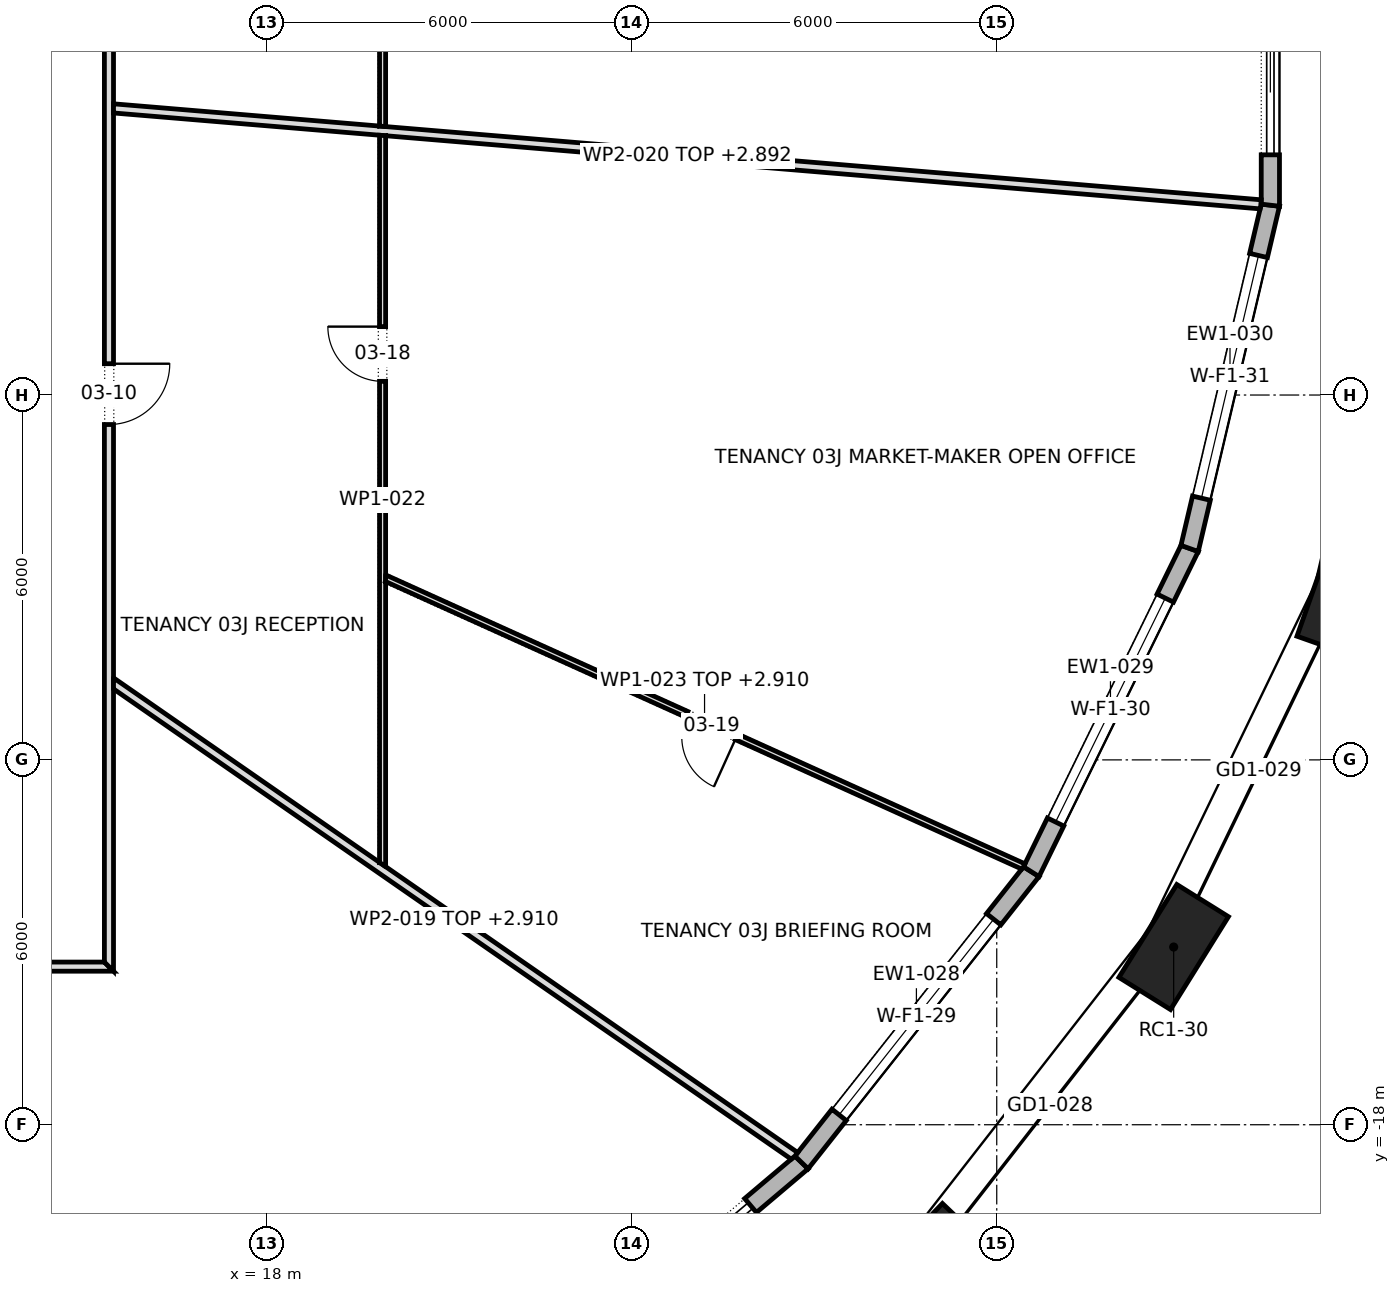
"""IFC4 building model, lengths in metres.
Left out: names, types, materials, properties, quantities, classifications, styles, units other than length and angle.
Written with IfcOpenShell. Run it as: python <this file> out.ifc"""

import sys

from ifc_helpers import new_model, si_unit, direction, frame, frame_2d, origin, origin_2d, place, context, subcontext, project, spatial, polyline, rectangle, outline, extrude, element, fill, save


model = new_model("IFC4")
c1 = context("Model", 3, precision=1e-05, world=origin(), true_north=direction((0.0, 1.0)))
c2 = subcontext(c1, "Body", "Model", "MODEL_VIEW")
j1 = project(units=[si_unit("LENGTHUNIT", "METRE"), si_unit("PLANEANGLEUNIT", "RADIAN")], contexts=[c1])
p1 = place(None, origin())
s1 = spatial("IfcSite", under=j1, at=p1, CompositionType="ELEMENT")
p2 = place(p1, origin())
s2 = spatial("IfcBuilding", under=s1, at=p2, CompositionType="ELEMENT")
p3 = place(p2, frame((0.0, 0.0, 48.7)))
s3 = spatial("IfcBuildingStorey", under=s2, at=p3, CompositionType="ELEMENT", Elevation=48.7)
for number, where, z_axis, x_axis in (
    (1, (28.845, -20.291, 0.0), (0.0, 0.0, 1.0), (0.692, 0.722, 0.0)),
    (2, (32.91, -15.078, 0.0), (0.0, 0.0, 1.0), (0.529, 0.849, 0.0)),
    (3, (35.709, -9.285, 0.0), (0.0, 0.0, 1.0), (0.334, 0.943, 0.0)),
):
    element("IfcColumn", number, at=place(p3, frame(where, z_axis=z_axis, x_axis=x_axis)), inside=s3, PredefinedType="COLUMN", context=c2, shape_type="SweptSolid", body=[
        extrude(rectangle(XDim=1.8, YDim=1.0, at=origin_2d()), origin(), (0.0, 0.0, 1.0), 4.2),
    ])
p4 = place(p3, frame((21.983, -22.684, 0.0), z_axis=(0.0, 0.0, 1.0), x_axis=(0.763614259808, 0.645672720671, 0.0)))
e4 = element("IfcWall", 4, at=p4, inside=s3, PredefinedType="STANDARD", context=c2, shape_type="SweptSolid", body=[
    extrude(outline(polyline([(-0.014, -0.15), (6.31, -0.15), (6.28, 0.15), (0.014, 0.15), (-0.014, -0.15)])), origin(), (0.0, 0.0, 1.0), 3.9),
])
p5 = place(p4, frame((1.097, 0.0, 0.0)))
e5 = element("IfcOpeningElement", 5, at=p5, cuts=e4, PredefinedType="OPENING", context=c2, shape_type="SweptSolid", body=[
    extrude(rectangle(XDim=4.1, YDim=3.45, at=frame_2d((2.05, 1.725))), frame((0.0, 0.162, 0.0), z_axis=(0.0, -1.0, 0.0), x_axis=(1.0, 0.0, 0.0)), (0.0, 0.0, 1.0), 0.324),
])
p6 = place(p3, frame((26.79, -18.62, 0.0), z_axis=(0.0, 0.0, 1.0), x_axis=(0.619993638342, 0.78460683684, 0.0)))
e6 = element("IfcWall", 6, at=p6, inside=s3, PredefinedType="STANDARD", context=c2, shape_type="SweptSolid", body=[
    extrude(outline(polyline([(-0.015, -0.15), (6.11, -0.15), (6.078, 0.15), (0.015, 0.15), (-0.015, -0.15)])), origin(), (0.0, 0.0, 1.0), 3.9),
])
p7 = place(p6, frame((0.997, 0.0, 0.6)))
e7 = element("IfcOpeningElement", 7, at=p7, cuts=e6, PredefinedType="OPENING", context=c2, shape_type="SweptSolid", body=[
    extrude(rectangle(XDim=4.1, YDim=2.85, at=frame_2d((2.05, 1.425))), frame((0.0, 0.162, 0.0), z_axis=(0.0, -1.0, 0.0), x_axis=(1.0, 0.0, 0.0)), (0.0, 0.0, 1.0), 0.324),
])
p8 = place(p3, frame((30.568, -13.838, 0.0), z_axis=(0.0, 0.0, 1.0), x_axis=(0.439906146647, 0.898043752911, 0.0)))
e8 = element("IfcWall", 8, at=p8, inside=s3, PredefinedType="STANDARD", context=c2, shape_type="SweptSolid", body=[
    extrude(outline(polyline([(-0.016, -0.15), (5.936, -0.15), (5.902, 0.15), (0.016, 0.15), (-0.016, -0.15)])), origin(), (0.0, 0.0, 1.0), 3.9),
])
p9 = place(p8, frame((0.909, 0.0, 0.6)))
e9 = element("IfcOpeningElement", 9, at=p9, cuts=e8, PredefinedType="OPENING", context=c2, shape_type="SweptSolid", body=[
    extrude(rectangle(XDim=4.1, YDim=2.85, at=frame_2d((2.05, 1.425))), frame((0.0, 0.162, 0.0), z_axis=(0.0, -1.0, 0.0), x_axis=(1.0, 0.0, 0.0)), (0.0, 0.0, 1.0), 0.324),
])
p10 = place(p3, frame((33.172, -8.523, 0.0), z_axis=(0.0, 0.0, 1.0), x_axis=(0.228990053972, 0.973428762253, 0.0)))
e10 = element("IfcWall", 10, at=p10, inside=s3, PredefinedType="STANDARD", context=c2, shape_type="SweptSolid", body=[
    extrude(outline(polyline([(-0.017, -0.15), (5.816, -0.15), (5.781, 0.15), (0.017, 0.15), (-0.017, -0.15)])), origin(), (0.0, 0.0, 1.0), 3.9),
])
p11 = place(p10, frame((0.849, 0.0, 0.6)))
e11 = element("IfcOpeningElement", 11, at=p11, cuts=e10, PredefinedType="OPENING", context=c2, shape_type="SweptSolid", body=[
    extrude(rectangle(XDim=4.1, YDim=2.85, at=frame_2d((2.05, 1.425))), frame((0.0, 0.162, 0.0), z_axis=(0.0, -1.0, 0.0), x_axis=(1.0, 0.0, 0.0)), (0.0, 0.0, 1.0), 0.324),
])
p12 = place(p3, frame((34.5, -2.878, 0.0), z_axis=(0.0, 0.0, 1.0), x_axis=(0.0, 1.0, 0.0)))
e12 = element("IfcWall", 12, at=p12, inside=s3, PredefinedType="STANDARD", context=c2, shape_type="SweptSolid", body=[
    extrude(outline(polyline([(-0.017, -0.15), (5.773, -0.15), (5.739, 0.15), (0.017, 0.15), (-0.017, -0.15)])), origin(), (0.0, 0.0, 1.0), 3.9),
])
p13 = place(p12, frame((0.828, 0.0, 0.0)))
e13 = element("IfcOpeningElement", 13, at=p13, cuts=e12, PredefinedType="OPENING", context=c2, shape_type="SweptSolid", body=[
    extrude(rectangle(XDim=4.1, YDim=3.45, at=frame_2d((2.05, 1.725))), frame((0.0, 0.162, 0.0), z_axis=(0.0, -1.0, 0.0), x_axis=(1.0, 0.0, 0.0)), (0.0, 0.0, 1.0), 0.324),
])
p14 = place(p3, frame((-15.475, -15.4, 0.0), z_axis=(0.0, 0.0, 1.0), x_axis=(1.0, 0.0, 0.0)))
e14 = element("IfcWall", 14, at=p14, inside=s3, PredefinedType="PARTITIONING", context=c2, shape_type="SweptSolid", body=[
    extrude(outline(polyline([(0.0, -0.075), (1.935, -0.075), (3.869, -0.075), (5.803, -0.075), (7.738, -0.075), (9.672, -0.075), (11.606, -0.075), (13.541, -0.075), (15.475, -0.075), (17.409, -0.075), (19.344, -0.075), (21.278, -0.075), (23.212, -0.075), (25.147, -0.075), (27.081, -0.075), (29.016, -0.075), (30.95, -0.075), (30.8, 0.075), (28.885, 0.075), (26.969, 0.075), (25.053, 0.075), (23.138, 0.075), (21.222, 0.075), (19.306, 0.075), (17.391, 0.075), (15.475, 0.075), (13.56, 0.075), (11.644, 0.075), (9.728, 0.075), (7.812, 0.075), (5.897, 0.075), (3.981, 0.075), (2.066, 0.075), (0.15, 0.075), (0.0, -0.075)])), origin(), (0.0, 0.0, 1.0), 3.9),
])
p15 = place(p14, frame((10.445, 0.0, 0.0)))
e15 = element("IfcOpeningElement", 15, at=p15, cuts=e14, PredefinedType="OPENING", context=c2, shape_type="SweptSolid", body=[
    extrude(rectangle(XDim=1.0, YDim=2.1, at=frame_2d((0.5, 1.05))), frame((0.0, 0.087, 0.0), z_axis=(0.0, -1.0, 0.0), x_axis=(1.0, 0.0, 0.0)), (0.0, 0.0, 1.0), 0.174),
])
p16 = place(p14, frame((18.07, 0.0, 0.0)))
e16 = element("IfcOpeningElement", 16, at=p16, cuts=e14, PredefinedType="OPENING", context=c2, shape_type="SweptSolid", body=[
    extrude(rectangle(XDim=1.0, YDim=2.1, at=frame_2d((0.5, 1.05))), frame((0.0, 0.087, 0.0), z_axis=(0.0, -1.0, 0.0), x_axis=(1.0, 0.0, 0.0)), (0.0, 0.0, 1.0), 0.174),
])
p17 = place(p14, frame((25.035, 0.0, 0.0)))
e17 = element("IfcOpeningElement", 17, at=p17, cuts=e14, PredefinedType="OPENING", context=c2, shape_type="SweptSolid", body=[
    extrude(rectangle(XDim=1.8, YDim=2.1, at=frame_2d((0.9, 1.05))), frame((0.0, 0.087, 0.0), z_axis=(0.0, -1.0, 0.0), x_axis=(1.0, 0.0, 0.0)), (0.0, 0.0, 1.0), 0.174),
])
p18 = place(p3, frame((15.4, -15.475, 0.0), z_axis=(0.0, 0.0, 1.0), x_axis=(0.0, 1.0, 0.0)))
e18 = element("IfcWall", 18, at=p18, inside=s3, PredefinedType="PARTITIONING", context=c2, shape_type="SweptSolid", body=[
    extrude(outline(polyline([(0.0, -0.075), (1.935, -0.075), (3.869, -0.075), (5.803, -0.075), (7.738, -0.075), (9.672, -0.075), (11.606, -0.075), (13.541, -0.075), (15.475, -0.075), (17.409, -0.075), (19.344, -0.075), (21.278, -0.075), (23.212, -0.075), (25.147, -0.075), (27.081, -0.075), (29.016, -0.075), (30.95, -0.075), (30.8, 0.075), (28.885, 0.075), (26.969, 0.075), (25.053, 0.075), (23.138, 0.075), (21.222, 0.075), (19.306, 0.075), (17.391, 0.075), (15.475, 0.075), (13.56, 0.075), (11.644, 0.075), (9.728, 0.075), (7.812, 0.075), (5.897, 0.075), (3.981, 0.075), (2.066, 0.075), (0.15, 0.075), (0.0, -0.075)])), origin(), (0.0, 0.0, 1.0), 3.9),
])
p19 = place(p18, frame((8.99, 0.0, 0.0)))
e19 = element("IfcOpeningElement", 19, at=p19, cuts=e18, PredefinedType="OPENING", context=c2, shape_type="SweptSolid", body=[
    extrude(rectangle(XDim=1.0, YDim=2.1, at=frame_2d((0.5, 1.05))), frame((0.0, 0.087, 0.0), z_axis=(0.0, -1.0, 0.0), x_axis=(1.0, 0.0, 0.0)), (0.0, 0.0, 1.0), 0.174),
])
p20 = place(p18, frame((17.815, 0.0, 0.0)))
e20 = element("IfcOpeningElement", 20, at=p20, cuts=e18, PredefinedType="OPENING", context=c2, shape_type="SweptSolid", body=[
    extrude(rectangle(XDim=1.0, YDim=2.1, at=frame_2d((0.5, 1.05))), frame((0.0, 0.087, 0.0), z_axis=(0.0, -1.0, 0.0), x_axis=(1.0, 0.0, 0.0)), (0.0, 0.0, 1.0), 0.174),
])
p21 = place(p18, frame((26.155, 0.0, 0.0)))
e21 = element("IfcOpeningElement", 21, at=p21, cuts=e18, PredefinedType="OPENING", context=c2, shape_type="SweptSolid", body=[
    extrude(rectangle(XDim=1.0, YDim=2.1, at=frame_2d((0.5, 1.05))), frame((0.0, 0.087, 0.0), z_axis=(0.0, -1.0, 0.0), x_axis=(1.0, 0.0, 0.0)), (0.0, 0.0, 1.0), 0.174),
])
p22 = place(p3, frame((15.433, -10.712, 0.0), z_axis=(0.0, 0.0, 1.0), x_axis=(0.82159356676, -0.570073689148, 0.0)))
e22 = element("IfcWall", 22, at=p22, inside=s3, PredefinedType="PARTITIONING", context=c2, shape_type="SweptSolid", body=[
    extrude(outline(polyline([(0.104, -0.075), (2.042, -0.075), (3.979, -0.075), (5.917, -0.075), (7.855, -0.075), (9.793, -0.075), (11.731, -0.075), (13.669, -0.075), (13.69, 0.002), (13.694, 0.074), (13.694, 0.075), (12.021, 0.075), (10.349, 0.075), (8.676, 0.075), (7.004, 0.075), (5.331, 0.075), (5.327, 0.072), (5.325, 0.075), (3.55, 0.075), (1.775, 0.075), (0.0, 0.075), (0.0, 0.074), (0.104, -0.075)])), origin(), (0.0, 0.0, 1.0), 2.91),
])
p23 = place(p3, frame((15.469, -1.286, 0.0), z_axis=(0.0, 0.0, 1.0), x_axis=(0.996520554602, -0.083347371018, 0.0)))
e23 = element("IfcWall", 23, at=p23, inside=s3, PredefinedType="PARTITIONING", context=c2, shape_type="SweptSolid", body=[
    extrude(outline(polyline([(0.012, -0.075), (1.506, -0.075), (2.999, -0.075), (4.492, -0.075), (4.503, -0.074), (4.503, -0.075), (6.307, -0.075), (8.111, -0.075), (9.915, -0.075), (11.719, -0.075), (13.523, -0.075), (15.327, -0.075), (17.131, -0.075), (18.935, -0.075), (18.94, -0.038), (18.94, 0.075), (17.122, 0.075), (15.304, 0.075), (13.486, 0.075), (11.667, 0.075), (9.849, 0.075), (8.031, 0.075), (6.213, 0.075), (4.395, 0.075), (4.39, 0.074), (4.39, 0.075), (2.927, 0.075), (1.463, 0.075), (0.0, 0.075), (0.012, -0.075)])), origin(), (0.0, 0.0, 1.0), 2.892),
])
p24 = place(p3, frame((19.9, -13.756, 0.0), z_axis=(0.0, 0.0, 1.0), x_axis=(0.0, 1.0, 0.0)))
e24 = element("IfcWall", 24, at=p24, inside=s3, PredefinedType="PARTITIONING", context=c2, shape_type="SweptSolid", body=[
    extrude(outline(polyline([(0.0, -0.05), (1.563, -0.05), (3.125, -0.05), (4.688, -0.05), (4.689, -0.048), (4.694, -0.05), (6.525, -0.05), (8.357, -0.05), (10.188, -0.05), (12.02, -0.05), (12.028, 0.049), (12.028, 0.05), (10.035, 0.05), (8.042, 0.05), (6.049, 0.05), (4.056, 0.05), (2.062, 0.05), (0.069, 0.05), (0.0, -0.05), (0.0, -0.05)])), origin(), (0.0, 0.0, 1.0), 3.9),
])
p25 = place(p24, frame((7.98, 0.0, 0.0)))
e25 = element("IfcOpeningElement", 25, at=p25, cuts=e24, PredefinedType="OPENING", context=c2, shape_type="SweptSolid", body=[
    extrude(rectangle(XDim=0.9, YDim=2.1, at=frame_2d((0.45, 1.05))), frame((0.0, 0.062, 0.0), z_axis=(0.0, -1.0, 0.0), x_axis=(1.0, 0.0, 0.0)), (0.0, 0.0, 1.0), 0.124),
])
p26 = place(p3, frame((19.93, -9.003, 0.0), z_axis=(0.0, 0.0, 1.0), x_axis=(0.911257901719, -0.41183617684, 0.0)))
e26 = element("IfcWall", 26, at=p26, inside=s3, PredefinedType="PARTITIONING", context=c2, shape_type="SweptSolid", body=[
    extrude(outline(polyline([(0.045, -0.05), (1.958, -0.05), (3.871, -0.05), (5.785, -0.05), (7.698, -0.05), (9.611, -0.05), (11.524, -0.05), (11.536, -0.004), (11.537, 0.048), (11.537, 0.05), (9.615, 0.05), (7.692, 0.05), (5.769, 0.05), (3.846, 0.05), (1.923, 0.05), (0.0, 0.05), (0.0, 0.049), (0.045, -0.05)])), origin(), (0.0, 0.0, 1.0), 2.91),
])
p27 = place(p26, frame((5.454, 0.0, 0.0)))
e27 = element("IfcOpeningElement", 27, at=p27, cuts=e26, PredefinedType="OPENING", context=c2, shape_type="SweptSolid", body=[
    extrude(rectangle(XDim=0.9, YDim=2.1, at=frame_2d((0.45, 1.05))), frame((0.0, 0.062, 0.0), z_axis=(0.0, -1.0, 0.0), x_axis=(1.0, 0.0, 0.0)), (0.0, 0.0, 1.0), 0.124),
])
p28 = place(p3, frame((19.9, -1.585, 0.0), z_axis=(0.0, 0.0, 1.0), x_axis=(0.0, 1.0, 0.0)))
e28 = element("IfcWall", 28, at=p28, inside=s3, PredefinedType="PARTITIONING", context=c2, shape_type="SweptSolid", body=[
    extrude(outline(polyline([(0.0, -0.05), (1.686, -0.05), (3.371, -0.05), (5.056, -0.05), (6.742, -0.05), (6.749, -0.048), (6.75, -0.05), (8.632, -0.05), (10.515, -0.05), (10.515, -0.049), (10.47, 0.05), (8.726, 0.05), (6.983, 0.05), (5.239, 0.05), (3.495, 0.05), (1.752, 0.05), (0.008, 0.05), (0.0, -0.046), (0.0, -0.05)])), origin(), (0.0, 0.0, 1.0), 3.9),
])
p29 = place(p28, frame((2.855, 0.0, 0.0)))
e29 = element("IfcOpeningElement", 29, at=p29, cuts=e28, PredefinedType="OPENING", context=c2, shape_type="SweptSolid", body=[
    extrude(rectangle(XDim=0.9, YDim=2.1, at=frame_2d((0.45, 1.05))), frame((0.0, 0.062, 0.0), z_axis=(0.0, -1.0, 0.0), x_axis=(1.0, 0.0, 0.0)), (0.0, 0.0, 1.0), 0.124),
])
p30 = place(p5, origin())
e30 = element("IfcDoor", 30, at=p30, inside=s3, OperationType="DOUBLE_DOOR_SLIDING", PredefinedType="DOOR", context=c2, shape_type="SweptSolid", body=[
    extrude(rectangle(XDim=4.1, YDim=3.45, at=frame_2d((2.05, 1.725))), frame((0.0, 0.025, 0.0), z_axis=(0.0, -1.0, 0.0), x_axis=(1.0, 0.0, 0.0)), (0.0, 0.0, 1.0), 0.05),
])
fill(e5, e30)
p31 = place(p7, origin())
e31 = element("IfcWindow", 31, at=p31, inside=s3, PartitioningType="TRIPLE_PANEL_VERTICAL", PredefinedType="WINDOW", context=c2, shape_type="SweptSolid", body=[
    extrude(rectangle(XDim=4.1, YDim=2.85, at=frame_2d((2.05, 1.425))), frame((0.0, 0.03, 0.0), z_axis=(0.0, -1.0, 0.0), x_axis=(1.0, 0.0, 0.0)), (0.0, 0.0, 1.0), 0.06),
])
fill(e7, e31)
p32 = place(p9, origin())
e32 = element("IfcWindow", 32, at=p32, inside=s3, PartitioningType="TRIPLE_PANEL_VERTICAL", PredefinedType="WINDOW", context=c2, shape_type="SweptSolid", body=[
    extrude(rectangle(XDim=4.1, YDim=2.85, at=frame_2d((2.05, 1.425))), frame((0.0, 0.03, 0.0), z_axis=(0.0, -1.0, 0.0), x_axis=(1.0, 0.0, 0.0)), (0.0, 0.0, 1.0), 0.06),
])
fill(e9, e32)
p33 = place(p11, origin())
e33 = element("IfcWindow", 33, at=p33, inside=s3, PartitioningType="TRIPLE_PANEL_VERTICAL", PredefinedType="WINDOW", context=c2, shape_type="SweptSolid", body=[
    extrude(rectangle(XDim=4.1, YDim=2.85, at=frame_2d((2.05, 1.425))), frame((0.0, 0.03, 0.0), z_axis=(0.0, -1.0, 0.0), x_axis=(1.0, 0.0, 0.0)), (0.0, 0.0, 1.0), 0.06),
])
fill(e11, e33)
p34 = place(p13, origin())
e34 = element("IfcDoor", 34, at=p34, inside=s3, OperationType="DOUBLE_DOOR_SLIDING", PredefinedType="DOOR", context=c2, shape_type="SweptSolid", body=[
    extrude(rectangle(XDim=4.1, YDim=3.45, at=frame_2d((2.05, 1.725))), frame((0.0, 0.025, 0.0), z_axis=(0.0, -1.0, 0.0), x_axis=(1.0, 0.0, 0.0)), (0.0, 0.0, 1.0), 0.05),
])
fill(e13, e34)
p35 = place(p19, frame((1.0, 0.0, 0.0), z_axis=(0.0, 0.0, 1.0), x_axis=(-1.0, 0.0, 0.0)))
e35 = element("IfcDoor", 35, at=p35, inside=s3, OperationType="SINGLE_SWING_RIGHT", PredefinedType="DOOR", context=c2, shape_type="SweptSolid", body=[
    extrude(rectangle(XDim=1.0, YDim=2.1, at=frame_2d((0.5, 1.05))), frame((0.0, 0.025, 0.0), z_axis=(0.0, -1.0, 0.0), x_axis=(1.0, 0.0, 0.0)), (0.0, 0.0, 1.0), 0.05),
])
fill(e19, e35)
p36 = place(p25, origin())
e36 = element("IfcDoor", 36, at=p36, inside=s3, OperationType="SINGLE_SWING_LEFT", PredefinedType="DOOR", context=c2, shape_type="SweptSolid", body=[
    extrude(rectangle(XDim=0.9, YDim=2.1, at=frame_2d((0.45, 1.05))), frame((0.0, 0.025, 0.0), z_axis=(0.0, -1.0, 0.0), x_axis=(1.0, 0.0, 0.0)), (0.0, 0.0, 1.0), 0.05),
])
fill(e25, e36)
p37 = place(p27, frame((0.9, 0.0, 0.0), z_axis=(0.0, 0.0, 1.0), x_axis=(-1.0, 0.0, 0.0)))
e37 = element("IfcDoor", 37, at=p37, inside=s3, OperationType="SINGLE_SWING_RIGHT", PredefinedType="DOOR", context=c2, shape_type="SweptSolid", body=[
    extrude(rectangle(XDim=0.9, YDim=2.1, at=frame_2d((0.45, 1.05))), frame((0.0, 0.025, 0.0), z_axis=(0.0, -1.0, 0.0), x_axis=(1.0, 0.0, 0.0)), (0.0, 0.0, 1.0), 0.05),
])
fill(e27, e37)
save(model, sys.argv[1])
